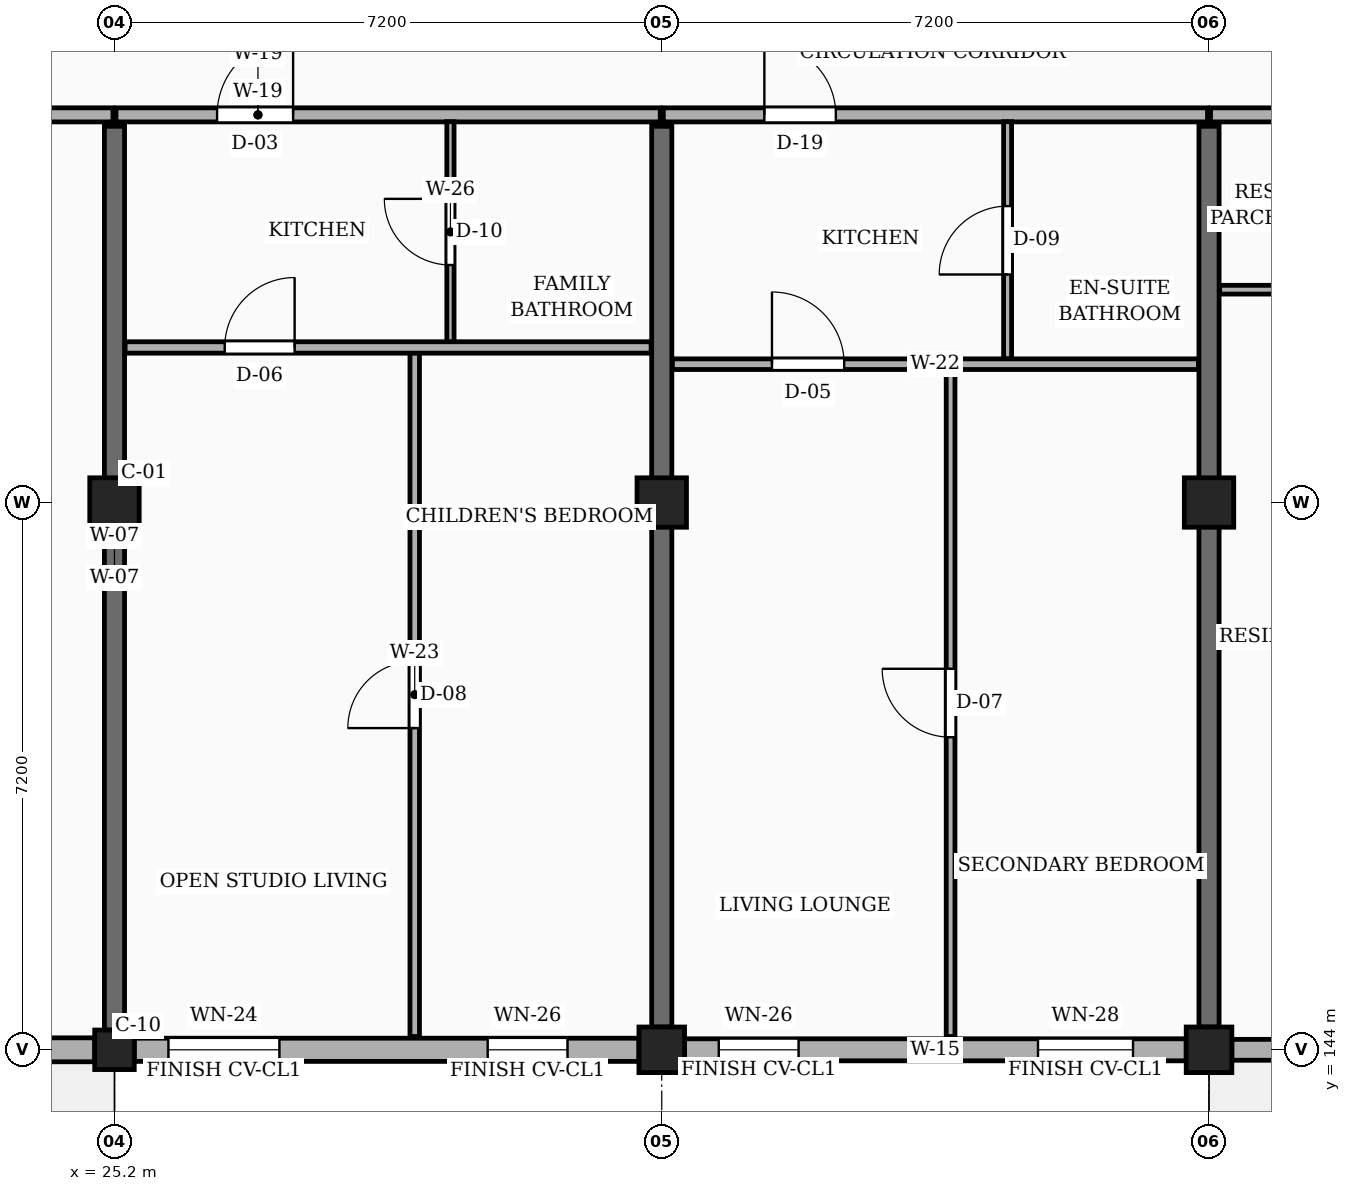
"""IFC4 building model, lengths in metres.
Left out: names, types, materials, properties, quantities, classifications, styles, units other than length and angle.
Written with IfcOpenShell. Run it as: python <this file> out.ifc"""

import sys

from ifc_helpers import new_model, si_unit, direction, frame, frame_2d, origin, origin_2d, place, context, subcontext, project, spatial, rectangle, circle, extrude, element, fill, save


model = new_model("IFC4")
c1 = context("Model", 3, precision=1e-05, world=origin(), true_north=direction((0.0, 1.0)))
c2 = subcontext(c1, "Body", "Model", "MODEL_VIEW")
j1 = project(units=[si_unit("LENGTHUNIT", "METRE"), si_unit("PLANEANGLEUNIT", "RADIAN")], contexts=[c1])
p1 = place(None, origin())
s1 = spatial("IfcSite", under=j1, at=p1, CompositionType="ELEMENT")
p2 = place(p1, origin())
s2 = spatial("IfcBuilding", under=s1, at=p2, CompositionType="ELEMENT")
p3 = place(p2, origin())
s3 = spatial("IfcBuildingStorey", under=s2, at=p3, CompositionType="ELEMENT", Elevation=0.0)
p4 = place(p3, frame((25.2, 144.0, 0.0), z_axis=(0.0, 0.0, 1.0), x_axis=(1.0, 0.0, 0.0)))
e1 = element("IfcColumn", 1, at=p4, inside=s3, PredefinedType="COLUMN", context=c2, shape_type="SweptSolid", body=[
    extrude(circle(Radius=0.26, at=origin_2d()), origin(), (0.0, 0.0, 1.0), 4.5),
])
p5 = place(p3, frame((25.2, 151.2, 0.0), z_axis=(0.0, 0.0, 1.0), x_axis=(1.0, 0.0, 0.0)))
e2 = element("IfcColumn", 2, at=p5, inside=s3, PredefinedType="COLUMN", context=c2, shape_type="SweptSolid", body=[
    extrude(rectangle(XDim=0.65, YDim=0.65, at=origin_2d()), origin(), (0.0, 0.0, 1.0), 4.5),
])
p6 = place(p3, frame((32.4, 144.0, 0.0), z_axis=(0.0, 0.0, 1.0), x_axis=(1.0, 0.0, 0.0)))
e3 = element("IfcColumn", 3, at=p6, inside=s3, PredefinedType="COLUMN", context=c2, shape_type="SweptSolid", body=[
    extrude(rectangle(XDim=0.6, YDim=0.6, at=origin_2d()), origin(), (0.0, 0.0, 1.0), 4.5),
])
p7 = place(p3, frame((32.4, 151.2, 0.0), z_axis=(0.0, 0.0, 1.0), x_axis=(1.0, 0.0, 0.0)))
e4 = element("IfcColumn", 4, at=p7, inside=s3, PredefinedType="COLUMN", context=c2, shape_type="SweptSolid", body=[
    extrude(rectangle(XDim=0.65, YDim=0.65, at=origin_2d()), origin(), (0.0, 0.0, 1.0), 4.5),
])
p8 = place(p3, frame((39.6, 144.0, 0.0), z_axis=(0.0, 0.0, 1.0), x_axis=(1.0, 0.0, 0.0)))
e5 = element("IfcColumn", 5, at=p8, inside=s3, PredefinedType="COLUMN", context=c2, shape_type="SweptSolid", body=[
    extrude(rectangle(XDim=0.6, YDim=0.6, at=origin_2d()), origin(), (0.0, 0.0, 1.0), 4.5),
])
p9 = place(p3, frame((39.6, 151.2, 0.0), z_axis=(0.0, 0.0, 1.0), x_axis=(1.0, 0.0, 0.0)))
e6 = element("IfcColumn", 6, at=p9, inside=s3, PredefinedType="COLUMN", context=c2, shape_type="SweptSolid", body=[
    extrude(rectangle(XDim=0.65, YDim=0.65, at=origin_2d()), origin(), (0.0, 0.0, 1.0), 4.5),
])
p10 = place(p3, frame((25.2, 144.26, 0.0), z_axis=(0.0, 0.0, 1.0), x_axis=(0.0, 1.0, 0.0)))
e7 = element("IfcWall", 7, at=p10, inside=s3, PredefinedType="SOLIDWALL", context=c2, shape_type="SweptSolid", body=[
    extrude(rectangle(XDim=11.89, YDim=0.265, at=frame_2d((5.945, 0.0))), origin(), (0.0, 0.0, 1.0), 3.535),
])
for number, where, z_axis, x_axis in (
    (8, (32.4, 144.3, 0.0), (0.0, 0.0, 1.0), (0.0, 1.0, 0.0)),
    (9, (39.6, 144.3, 0.0), (0.0, 0.0, 1.0), (0.0, 1.0, 0.0)),
):
    element("IfcWall", number, at=place(p3, frame(where, z_axis=z_axis, x_axis=x_axis)), inside=s3, PredefinedType="SOLIDWALL", context=c2, shape_type="SweptSolid", body=[
        extrude(rectangle(XDim=11.85, YDim=0.265, at=frame_2d((5.925, 0.0))), origin(), (0.0, 0.0, 1.0), 3.535),
    ])
p11 = place(p3, frame((18.3, 144.0, 0.0), z_axis=(0.0, 0.0, 1.0), x_axis=(1.0, 0.0, 0.0)))
e10 = element("IfcWall", 10, at=p11, inside=s3, PredefinedType="SOLIDWALL", context=c2, shape_type="SweptSolid", body=[
    extrude(rectangle(XDim=6.64, YDim=0.315, at=frame_2d((3.32, 0.0))), origin(), (0.0, 0.0, 1.0), 3.805),
])
p12 = place(p11, frame((2.37, 0.0, 0.0)))
e11 = element("IfcOpeningElement", 11, at=p12, cuts=e10, PredefinedType="OPENING", context=c2, shape_type="SweptSolid", body=[
    extrude(rectangle(XDim=1.9, YDim=2.2, at=frame_2d((0.95, 1.1))), frame((0.0, 0.167, 0.0), z_axis=(0.0, -1.0, 0.0), x_axis=(1.0, 0.0, 0.0)), (0.0, 0.0, 1.0), 0.335),
])
p13 = place(p3, frame((25.46, 144.0, 0.0), z_axis=(0.0, 0.0, 1.0), x_axis=(1.0, 0.0, 0.0)))
e12 = element("IfcWall", 12, at=p13, inside=s3, PredefinedType="SOLIDWALL", context=c2, shape_type="SweptSolid", body=[
    extrude(rectangle(XDim=6.64, YDim=0.305, at=frame_2d((3.32, 0.0))), origin(), (0.0, 0.0, 1.0), 3.805),
])
p14 = place(p13, frame((0.45, 0.0, 0.78)))
e13 = element("IfcOpeningElement", 13, at=p14, cuts=e12, PredefinedType="OPENING", context=c2, shape_type="SweptSolid", body=[
    extrude(rectangle(XDim=1.46, YDim=1.36, at=frame_2d((0.73, 0.68))), frame((0.0, 0.163, 0.0), z_axis=(0.0, -1.0, 0.0), x_axis=(1.0, 0.0, 0.0)), (0.0, 0.0, 1.0), 0.325),
])
p15 = place(p13, frame((4.65, 0.0, 0.78)))
e14 = element("IfcOpeningElement", 14, at=p15, cuts=e12, PredefinedType="OPENING", context=c2, shape_type="SweptSolid", body=[
    extrude(rectangle(XDim=1.05, YDim=1.44, at=frame_2d((0.525, 0.72))), frame((0.0, 0.163, 0.0), z_axis=(0.0, -1.0, 0.0), x_axis=(1.0, 0.0, 0.0)), (0.0, 0.0, 1.0), 0.325),
])
p16 = place(p3, frame((32.7, 144.0, 0.0), z_axis=(0.0, 0.0, 1.0), x_axis=(1.0, 0.0, 0.0)))
e15 = element("IfcWall", 15, at=p16, inside=s3, PredefinedType="SOLIDWALL", context=c2, shape_type="SweptSolid", body=[
    extrude(rectangle(XDim=6.6, YDim=0.29, at=frame_2d((3.3, 0.0))), origin(), (0.0, 0.0, 1.0), 3.805),
])
p17 = place(p16, frame((0.45, 0.0, 0.78)))
e16 = element("IfcOpeningElement", 16, at=p17, cuts=e15, PredefinedType="OPENING", context=c2, shape_type="SweptSolid", body=[
    extrude(rectangle(XDim=1.05, YDim=1.44, at=frame_2d((0.525, 0.72))), frame((0.0, 0.155, 0.0), z_axis=(0.0, -1.0, 0.0), x_axis=(1.0, 0.0, 0.0)), (0.0, 0.0, 1.0), 0.31),
])
p18 = place(p16, frame((4.65, 0.0, 0.78)))
e17 = element("IfcOpeningElement", 17, at=p18, cuts=e15, PredefinedType="OPENING", context=c2, shape_type="SweptSolid", body=[
    extrude(rectangle(XDim=1.25, YDim=1.44, at=frame_2d((0.625, 0.72))), frame((0.0, 0.155, 0.0), z_axis=(0.0, -1.0, 0.0), x_axis=(1.0, 0.0, 0.0)), (0.0, 0.0, 1.0), 0.31),
])
p19 = place(p3, frame((39.9, 144.0, 0.0), z_axis=(0.0, 0.0, 1.0), x_axis=(1.0, 0.0, 0.0)))
e18 = element("IfcWall", 18, at=p19, inside=s3, PredefinedType="SOLIDWALL", context=c2, shape_type="SweptSolid", body=[
    extrude(rectangle(XDim=6.6, YDim=0.275, at=frame_2d((3.3, 0.0))), origin(), (0.0, 0.0, 1.0), 3.805),
])
p20 = place(p19, frame((2.4, 0.0, 0.0)))
e19 = element("IfcOpeningElement", 19, at=p20, cuts=e18, PredefinedType="OPENING", context=c2, shape_type="SweptSolid", body=[
    extrude(rectangle(XDim=1.8, YDim=2.2, at=frame_2d((0.9, 1.1))), frame((0.0, 0.147, 0.0), z_axis=(0.0, -1.0, 0.0), x_axis=(1.0, 0.0, 0.0)), (0.0, 0.0, 1.0), 0.295),
])
p21 = place(p3, frame((18.02, 156.3, 0.0), z_axis=(0.0, 0.0, 1.0), x_axis=(1.0, 0.0, 0.0)))
e20 = element("IfcWall", 20, at=p21, inside=s3, PredefinedType="PARTITIONING", context=c2, shape_type="SweptSolid", body=[
    extrude(rectangle(XDim=7.16, YDim=0.185, at=frame_2d((3.58, 0.0))), origin(), (0.0, 0.0, 1.0), 3.67),
])
p22 = place(p21, frame((4.33, 0.0, 0.0)))
e21 = element("IfcOpeningElement", 21, at=p22, cuts=e20, PredefinedType="OPENING", context=c2, shape_type="SweptSolid", body=[
    extrude(rectangle(XDim=1.1, YDim=2.15, at=frame_2d((0.55, 1.075))), frame((0.0, 0.103, 0.0), z_axis=(0.0, -1.0, 0.0), x_axis=(1.0, 0.0, 0.0)), (0.0, 0.0, 1.0), 0.205),
])
p23 = place(p3, frame((25.22, 156.3, 0.0), z_axis=(0.0, 0.0, 1.0), x_axis=(1.0, 0.0, 0.0)))
e22 = element("IfcWall", 22, at=p23, inside=s3, PredefinedType="PARTITIONING", context=c2, shape_type="SweptSolid", body=[
    extrude(rectangle(XDim=7.16, YDim=0.185, at=frame_2d((3.58, 0.0))), origin(), (0.0, 0.0, 1.0), 3.67),
])
p24 = place(p23, frame((1.33, 0.0, 0.0)))
e23 = element("IfcOpeningElement", 23, at=p24, cuts=e22, PredefinedType="OPENING", context=c2, shape_type="SweptSolid", body=[
    extrude(rectangle(XDim=1.0, YDim=2.15, at=frame_2d((0.5, 1.075))), frame((0.0, 0.103, 0.0), z_axis=(0.0, -1.0, 0.0), x_axis=(1.0, 0.0, 0.0)), (0.0, 0.0, 1.0), 0.205),
])
p25 = place(p3, frame((32.42, 156.3, 0.0), z_axis=(0.0, 0.0, 1.0), x_axis=(1.0, 0.0, 0.0)))
e24 = element("IfcWall", 24, at=p25, inside=s3, PredefinedType="PARTITIONING", context=c2, shape_type="SweptSolid", body=[
    extrude(rectangle(XDim=7.16, YDim=0.185, at=frame_2d((3.58, 0.0))), origin(), (0.0, 0.0, 1.0), 3.67),
])
p26 = place(p25, frame((1.33, 0.0, 0.0)))
e25 = element("IfcOpeningElement", 25, at=p26, cuts=e24, PredefinedType="OPENING", context=c2, shape_type="SweptSolid", body=[
    extrude(rectangle(XDim=0.94, YDim=2.12, at=frame_2d((0.47, 1.06))), frame((0.0, 0.103, 0.0), z_axis=(0.0, -1.0, 0.0), x_axis=(1.0, 0.0, 0.0)), (0.0, 0.0, 1.0), 0.205),
])
p27 = place(p3, frame((39.62, 156.3, 0.0), z_axis=(0.0, 0.0, 1.0), x_axis=(1.0, 0.0, 0.0)))
e26 = element("IfcWall", 26, at=p27, inside=s3, PredefinedType="PARTITIONING", context=c2, shape_type="SweptSolid", body=[
    extrude(rectangle(XDim=7.16, YDim=0.185, at=frame_2d((3.58, 0.0))), origin(), (0.0, 0.0, 1.0), 3.67),
])
p28 = place(p27, frame((4.33, 0.0, 0.0)))
e27 = element("IfcOpeningElement", 27, at=p28, cuts=e26, PredefinedType="OPENING", context=c2, shape_type="SweptSolid", body=[
    extrude(rectangle(XDim=1.1, YDim=2.15, at=frame_2d((0.55, 1.075))), frame((0.0, 0.103, 0.0), z_axis=(0.0, -1.0, 0.0), x_axis=(1.0, 0.0, 0.0)), (0.0, 0.0, 1.0), 0.205),
])
p29 = place(p3, frame((29.15, 144.175, 0.0), z_axis=(0.0, 0.0, 1.0), x_axis=(0.0, 1.0, 0.0)))
e28 = element("IfcWall", 28, at=p29, inside=s3, PredefinedType="PARTITIONING", context=c2, shape_type="SweptSolid", body=[
    extrude(rectangle(XDim=8.995, YDim=0.125, at=frame_2d((4.498, 0.0))), origin(), (0.0, 0.0, 1.0), 3.67),
])
p30 = place(p29, frame((4.058, 0.0, 0.0)))
e29 = element("IfcOpeningElement", 29, at=p30, cuts=e28, PredefinedType="OPENING", context=c2, shape_type="SweptSolid", body=[
    extrude(rectangle(XDim=0.88, YDim=2.08, at=frame_2d((0.44, 1.04))), frame((0.0, 0.073, 0.0), z_axis=(0.0, -1.0, 0.0), x_axis=(1.0, 0.0, 0.0)), (0.0, 0.0, 1.0), 0.145),
])
p31 = place(p3, frame((29.62, 153.31, 0.0), z_axis=(0.0, 0.0, 1.0), x_axis=(0.0, 1.0, 0.0)))
e30 = element("IfcWall", 30, at=p31, inside=s3, PredefinedType="PARTITIONING", context=c2, shape_type="SweptSolid", body=[
    extrude(rectangle(XDim=2.9, YDim=0.095, at=frame_2d((1.45, 0.0))), origin(), (0.0, 0.0, 1.0), 3.67),
])
p32 = place(p31, frame((1.015, 0.0, 0.0)))
e31 = element("IfcOpeningElement", 31, at=p32, cuts=e30, PredefinedType="OPENING", context=c2, shape_type="SweptSolid", body=[
    extrude(rectangle(XDim=0.87, YDim=2.05, at=frame_2d((0.435, 1.025))), frame((0.0, 0.058, 0.0), z_axis=(0.0, -1.0, 0.0), x_axis=(1.0, 0.0, 0.0)), (0.0, 0.0, 1.0), 0.115),
])
p33 = place(p3, frame((25.34, 153.24, 0.0), z_axis=(0.0, 0.0, 1.0), x_axis=(1.0, 0.0, 0.0)))
e32 = element("IfcWall", 32, at=p33, inside=s3, PredefinedType="PARTITIONING", context=c2, shape_type="SweptSolid", body=[
    extrude(rectangle(XDim=6.92, YDim=0.15, at=frame_2d((3.46, 0.0))), origin(), (0.0, 0.0, 1.0), 3.67),
])
p34 = place(p33, frame((1.31, 0.0, 0.0)))
e33 = element("IfcOpeningElement", 33, at=p34, cuts=e32, PredefinedType="OPENING", context=c2, shape_type="SweptSolid", body=[
    extrude(rectangle(XDim=0.92, YDim=2.1, at=frame_2d((0.46, 1.05))), frame((0.0, 0.085, 0.0), z_axis=(0.0, -1.0, 0.0), x_axis=(1.0, 0.0, 0.0)), (0.0, 0.0, 1.0), 0.17),
])
p35 = place(p3, frame((36.2, 144.175, 0.0), z_axis=(0.0, 0.0, 1.0), x_axis=(0.0, 1.0, 0.0)))
e34 = element("IfcWall", 34, at=p35, inside=s3, PredefinedType="PARTITIONING", context=c2, shape_type="SweptSolid", body=[
    extrude(rectangle(XDim=8.775, YDim=0.115, at=frame_2d((4.387, 0.0))), origin(), (0.0, 0.0, 1.0), 3.67),
])
p36 = place(p35, frame((3.938, 0.0, 0.0)))
e35 = element("IfcOpeningElement", 35, at=p36, cuts=e34, PredefinedType="OPENING", context=c2, shape_type="SweptSolid", body=[
    extrude(rectangle(XDim=0.9, YDim=2.1, at=frame_2d((0.45, 1.05))), frame((0.0, 0.067, 0.0), z_axis=(0.0, -1.0, 0.0), x_axis=(1.0, 0.0, 0.0)), (0.0, 0.0, 1.0), 0.135),
])
p37 = place(p3, frame((36.95, 153.09, 0.0), z_axis=(0.0, 0.0, 1.0), x_axis=(0.0, 1.0, 0.0)))
e36 = element("IfcWall", 36, at=p37, inside=s3, PredefinedType="PARTITIONING", context=c2, shape_type="SweptSolid", body=[
    extrude(rectangle(XDim=3.12, YDim=0.105, at=frame_2d((1.56, 0.0))), origin(), (0.0, 0.0, 1.0), 3.67),
])
p38 = place(p37, frame((1.11, 0.0, 0.0)))
e37 = element("IfcOpeningElement", 37, at=p38, cuts=e36, PredefinedType="OPENING", context=c2, shape_type="SweptSolid", body=[
    extrude(rectangle(XDim=0.9, YDim=2.05, at=frame_2d((0.45, 1.025))), frame((0.0, 0.062, 0.0), z_axis=(0.0, -1.0, 0.0), x_axis=(1.0, 0.0, 0.0)), (0.0, 0.0, 1.0), 0.125),
])
p39 = place(p3, frame((32.54, 153.02, 0.0), z_axis=(0.0, 0.0, 1.0), x_axis=(1.0, 0.0, 0.0)))
e38 = element("IfcWall", 38, at=p39, inside=s3, PredefinedType="PARTITIONING", context=c2, shape_type="SweptSolid", body=[
    extrude(rectangle(XDim=6.92, YDim=0.14, at=frame_2d((3.46, 0.0))), origin(), (0.0, 0.0, 1.0), 3.67),
])
p40 = place(p39, frame((1.31, 0.0, 0.0)))
e39 = element("IfcOpeningElement", 39, at=p40, cuts=e38, PredefinedType="OPENING", context=c2, shape_type="SweptSolid", body=[
    extrude(rectangle(XDim=0.95, YDim=2.1, at=frame_2d((0.475, 1.05))), frame((0.0, 0.08, 0.0), z_axis=(0.0, -1.0, 0.0), x_axis=(1.0, 0.0, 0.0)), (0.0, 0.0, 1.0), 0.16),
])
p41 = place(p3, frame((39.74, 154.0, 0.0), z_axis=(0.0, 0.0, 1.0), x_axis=(1.0, 0.0, 0.0)))
e40 = element("IfcWall", 40, at=p41, inside=s3, PredefinedType="PARTITIONING", context=c2, shape_type="SweptSolid", body=[
    extrude(rectangle(XDim=2.41, YDim=0.115, at=frame_2d((1.205, 0.0))), origin(), (0.0, 0.0, 1.0), 3.67),
])
p42 = place(p14, origin())
e41 = element("IfcWindow", 41, at=p42, inside=s3, PartitioningType="SINGLE_PANEL", PredefinedType="WINDOW", context=c2, shape_type="SweptSolid", body=[
    extrude(rectangle(XDim=1.46, YDim=1.36, at=frame_2d((0.73, 0.68))), frame((0.0, 0.03, 0.0), z_axis=(0.0, -1.0, 0.0), x_axis=(1.0, 0.0, 0.0)), (0.0, 0.0, 1.0), 0.06),
])
fill(e13, e41)
p43 = place(p15, origin())
e42 = element("IfcWindow", 42, at=p43, inside=s3, PartitioningType="SINGLE_PANEL", PredefinedType="WINDOW", context=c2, shape_type="SweptSolid", body=[
    extrude(rectangle(XDim=1.05, YDim=1.44, at=frame_2d((0.525, 0.72))), frame((0.0, 0.03, 0.0), z_axis=(0.0, -1.0, 0.0), x_axis=(1.0, 0.0, 0.0)), (0.0, 0.0, 1.0), 0.06),
])
fill(e14, e42)
p44 = place(p17, origin())
e43 = element("IfcWindow", 43, at=p44, inside=s3, PartitioningType="SINGLE_PANEL", PredefinedType="WINDOW", context=c2, shape_type="SweptSolid", body=[
    extrude(rectangle(XDim=1.05, YDim=1.44, at=frame_2d((0.525, 0.72))), frame((0.0, 0.03, 0.0), z_axis=(0.0, -1.0, 0.0), x_axis=(1.0, 0.0, 0.0)), (0.0, 0.0, 1.0), 0.06),
])
fill(e16, e43)
p45 = place(p18, origin())
e44 = element("IfcWindow", 44, at=p45, inside=s3, PartitioningType="SINGLE_PANEL", PredefinedType="WINDOW", context=c2, shape_type="SweptSolid", body=[
    extrude(rectangle(XDim=1.25, YDim=1.44, at=frame_2d((0.625, 0.72))), frame((0.0, 0.03, 0.0), z_axis=(0.0, -1.0, 0.0), x_axis=(1.0, 0.0, 0.0)), (0.0, 0.0, 1.0), 0.06),
])
fill(e17, e44)
p46 = place(p24, origin())
e45 = element("IfcDoor", 45, at=p46, inside=s3, OperationType="SINGLE_SWING_RIGHT", PredefinedType="DOOR", context=c2, shape_type="SweptSolid", body=[
    extrude(rectangle(XDim=1.0, YDim=2.15, at=frame_2d((0.5, 1.075))), frame((0.0, 0.025, 0.0), z_axis=(0.0, -1.0, 0.0), x_axis=(1.0, 0.0, 0.0)), (0.0, 0.0, 1.0), 0.05),
])
fill(e23, e45)
p47 = place(p26, origin())
e46 = element("IfcDoor", 46, at=p47, inside=s3, OperationType="SINGLE_SWING_LEFT", PredefinedType="DOOR", context=c2, shape_type="SweptSolid", body=[
    extrude(rectangle(XDim=0.94, YDim=2.12, at=frame_2d((0.47, 1.06))), frame((0.0, 0.025, 0.0), z_axis=(0.0, -1.0, 0.0), x_axis=(1.0, 0.0, 0.0)), (0.0, 0.0, 1.0), 0.05),
])
fill(e25, e46)
p48 = place(p30, origin())
e47 = element("IfcDoor", 47, at=p48, inside=s3, OperationType="SINGLE_SWING_LEFT", PredefinedType="DOOR", context=c2, shape_type="SweptSolid", body=[
    extrude(rectangle(XDim=0.88, YDim=2.08, at=frame_2d((0.44, 1.04))), frame((0.0, 0.025, 0.0), z_axis=(0.0, -1.0, 0.0), x_axis=(1.0, 0.0, 0.0)), (0.0, 0.0, 1.0), 0.05),
])
fill(e29, e47)
p49 = place(p32, origin())
e48 = element("IfcDoor", 48, at=p49, inside=s3, OperationType="SINGLE_SWING_RIGHT", PredefinedType="DOOR", context=c2, shape_type="SweptSolid", body=[
    extrude(rectangle(XDim=0.87, YDim=2.05, at=frame_2d((0.435, 1.025))), frame((0.0, 0.025, 0.0), z_axis=(0.0, -1.0, 0.0), x_axis=(1.0, 0.0, 0.0)), (0.0, 0.0, 1.0), 0.05),
])
fill(e31, e48)
p50 = place(p34, origin())
e49 = element("IfcDoor", 49, at=p50, inside=s3, OperationType="SINGLE_SWING_RIGHT", PredefinedType="DOOR", context=c2, shape_type="SweptSolid", body=[
    extrude(rectangle(XDim=0.92, YDim=2.1, at=frame_2d((0.46, 1.05))), frame((0.0, 0.025, 0.0), z_axis=(0.0, -1.0, 0.0), x_axis=(1.0, 0.0, 0.0)), (0.0, 0.0, 1.0), 0.05),
])
fill(e33, e49)
p51 = place(p36, origin())
e50 = element("IfcDoor", 50, at=p51, inside=s3, OperationType="SINGLE_SWING_RIGHT", PredefinedType="DOOR", context=c2, shape_type="SweptSolid", body=[
    extrude(rectangle(XDim=0.9, YDim=2.1, at=frame_2d((0.45, 1.05))), frame((0.0, 0.025, 0.0), z_axis=(0.0, -1.0, 0.0), x_axis=(1.0, 0.0, 0.0)), (0.0, 0.0, 1.0), 0.05),
])
fill(e35, e50)
p52 = place(p38, origin())
e51 = element("IfcDoor", 51, at=p52, inside=s3, OperationType="SINGLE_SWING_LEFT", PredefinedType="DOOR", context=c2, shape_type="SweptSolid", body=[
    extrude(rectangle(XDim=0.9, YDim=2.05, at=frame_2d((0.45, 1.025))), frame((0.0, 0.025, 0.0), z_axis=(0.0, -1.0, 0.0), x_axis=(1.0, 0.0, 0.0)), (0.0, 0.0, 1.0), 0.05),
])
fill(e37, e51)
p53 = place(p40, origin())
e52 = element("IfcDoor", 52, at=p53, inside=s3, OperationType="SINGLE_SWING_LEFT", PredefinedType="DOOR", context=c2, shape_type="SweptSolid", body=[
    extrude(rectangle(XDim=0.95, YDim=2.1, at=frame_2d((0.475, 1.05))), frame((0.0, 0.025, 0.0), z_axis=(0.0, -1.0, 0.0), x_axis=(1.0, 0.0, 0.0)), (0.0, 0.0, 1.0), 0.05),
])
fill(e39, e52)
save(model, sys.argv[1])
